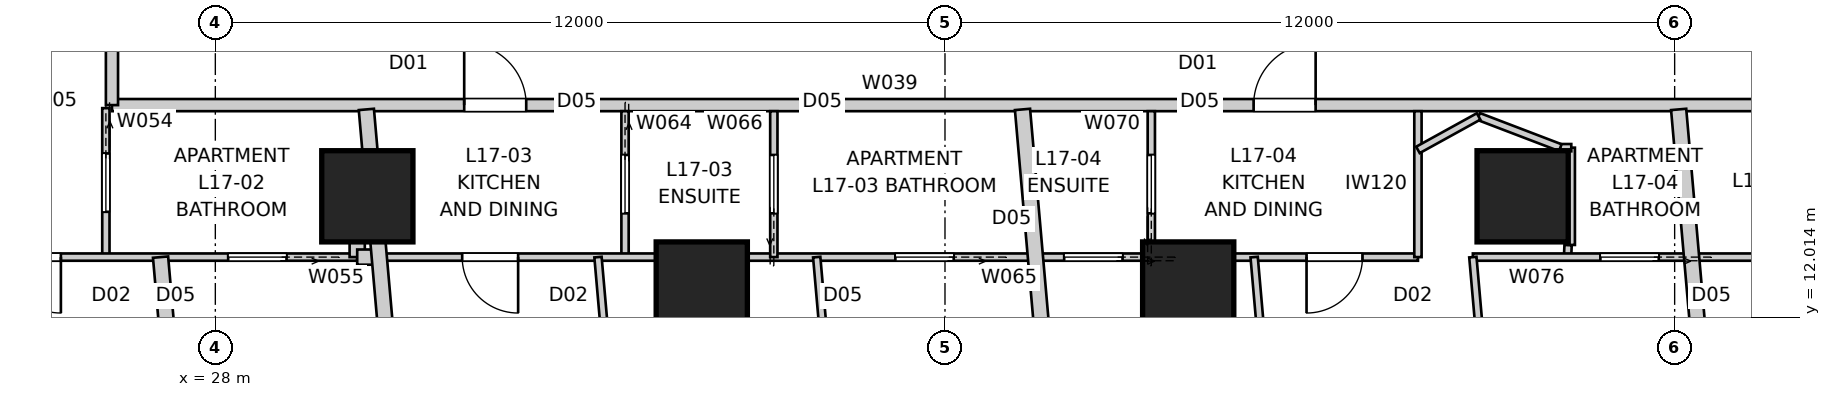
"""IFC4 building model, lengths in metres.
Left out: names, types, materials, properties, quantities, classifications, styles, units other than length and angle.
Written with IfcOpenShell. Run it as: python <this file> out.ifc"""

import sys

from ifc_helpers import new_model, si_unit, direction, frame, frame_2d, origin, origin_2d, place, context, subcontext, project, spatial, rectangle, extrude, element, fill, save


model = new_model("IFC4")
c1 = context("Model", 3, precision=1e-05, world=origin(), true_north=direction((0.0, 1.0)))
c2 = subcontext(c1, "Body", "Model", "MODEL_VIEW")
j1 = project(units=[si_unit("LENGTHUNIT", "METRE"), si_unit("PLANEANGLEUNIT", "RADIAN")], contexts=[c1])
p1 = place(None, origin())
s1 = spatial("IfcSite", under=j1, at=p1, CompositionType="ELEMENT")
p2 = place(p1, origin())
s2 = spatial("IfcBuilding", under=s1, at=p2, CompositionType="ELEMENT")
p3 = place(p2, frame((0.0, 0.0, 64.2)))
s3 = spatial("IfcBuildingStorey", under=s2, at=p3, CompositionType="ELEMENT", Elevation=64.2)
for number, where, z_axis, x_axis in (
    (1, (30.5, 14.0, 0.0), (0.0, 0.0, 1.0), (1.0, 0.0, 0.0)),
    (2, (36.0, 12.5, 0.0), (0.0, 0.0, 1.0), (1.0, 0.0, 0.0)),
    (3, (44.0, 12.5, 0.0), (0.0, 0.0, 1.0), (1.0, 0.0, 0.0)),
    (4, (49.5, 14.0, 0.0), (0.0, 0.0, 1.0), (1.0, 0.0, 0.0)),
):
    element("IfcColumn", number, at=place(p3, frame(where, z_axis=z_axis, x_axis=x_axis)), inside=s3, PredefinedType="COLUMN", context=c2, shape_type="SweptSolid", body=[
        extrude(rectangle(XDim=1.5, YDim=1.5, at=origin_2d()), origin(), (0.0, 0.0, 1.0), 3.4),
    ])
p4 = place(p3, frame((26.3, 15.5, 0.0), z_axis=(0.0, 0.0, 1.0), x_axis=(1.0, 0.0, 0.0)))
e5 = element("IfcWall", 5, at=p4, inside=s3, PredefinedType="PARTITIONING", context=c2, shape_type="SweptSolid", body=[
    extrude(rectangle(XDim=27.4, YDim=0.2, at=frame_2d((13.7, 0.0))), origin(), (0.0, 0.0, 1.0), 3.25),
])
p5 = place(p4, frame((18.776, 0.0, 0.0)))
e6 = element("IfcOpeningElement", 6, at=p5, cuts=e5, PredefinedType="OPENING", context=c2, shape_type="SweptSolid", body=[
    extrude(rectangle(XDim=1.02, YDim=2.34, at=frame_2d((0.51, 1.17))), frame((0.0, 0.11, 0.0), z_axis=(0.0, -1.0, 0.0), x_axis=(1.0, 0.0, 0.0)), (0.0, 0.0, 1.0), 0.22),
])
p6 = place(p4, frame((5.793, 0.0, 0.0)))
e7 = element("IfcOpeningElement", 7, at=p6, cuts=e5, PredefinedType="OPENING", context=c2, shape_type="SweptSolid", body=[
    extrude(rectangle(XDim=1.02, YDim=2.34, at=frame_2d((0.51, 1.17))), frame((0.0, 0.11, 0.0), z_axis=(0.0, -1.0, 0.0), x_axis=(1.0, 0.0, 0.0)), (0.0, 0.0, 1.0), 0.22),
])
p7 = place(p3, frame((26.3, 44.5, 0.0), z_axis=(0.0, 0.0, 1.0), x_axis=(0.0, -1.0, 0.0)))
e8 = element("IfcWall", 8, at=p7, inside=s3, PredefinedType="PARTITIONING", context=c2, shape_type="SweptSolid", body=[
    extrude(rectangle(XDim=29.0, YDim=0.2, at=frame_2d((14.5, 0.0))), origin(), (0.0, 0.0, 1.0), 3.25),
])
p8 = place(p7, frame((6.85, 0.0, 0.0)))
e9 = element("IfcOpeningElement", 9, at=p8, cuts=e8, PredefinedType="OPENING", context=c2, shape_type="SweptSolid", body=[
    extrude(rectangle(XDim=1.02, YDim=2.34, at=frame_2d((0.51, 1.17))), frame((0.0, 0.11, 0.0), z_axis=(0.0, -1.0, 0.0), x_axis=(1.0, 0.0, 0.0)), (0.0, 0.0, 1.0), 0.22),
])
p9 = place(p7, frame((2.345, 0.0, 0.0)))
e10 = element("IfcOpeningElement", 10, at=p9, cuts=e8, PredefinedType="OPENING", context=c2, shape_type="SweptSolid", body=[
    extrude(rectangle(XDim=1.02, YDim=2.1, at=frame_2d((0.51, 1.05))), frame((0.0, 0.11, 0.0), z_axis=(0.0, -1.0, 0.0), x_axis=(1.0, 0.0, 0.0)), (0.0, 0.0, 1.0), 0.22),
])
p10 = place(p7, frame((17.166, 0.0, 0.0)))
e11 = element("IfcOpeningElement", 11, at=p10, cuts=e8, PredefinedType="OPENING", context=c2, shape_type="SweptSolid", body=[
    extrude(rectangle(XDim=1.02, YDim=2.34, at=frame_2d((0.51, 1.17))), frame((0.0, 0.11, 0.0), z_axis=(0.0, -1.0, 0.0), x_axis=(1.0, 0.0, 0.0)), (0.0, 0.0, 1.0), 0.22),
])
p11 = place(p7, frame((27.055, 0.0, 0.0)))
e12 = element("IfcOpeningElement", 12, at=p11, cuts=e8, PredefinedType="OPENING", context=c2, shape_type="SweptSolid", body=[
    extrude(rectangle(XDim=1.02, YDim=2.34, at=frame_2d((0.51, 1.17))), frame((0.0, 0.11, 0.0), z_axis=(0.0, -1.0, 0.0), x_axis=(1.0, 0.0, 0.0)), (0.0, 0.0, 1.0), 0.22),
])
p12 = place(p3, frame((42.222, 4.597, 0.0), z_axis=(0.0, 0.0, 1.0), x_axis=(-0.087140211333, 0.996196056792, 0.0)))
e13 = element("IfcWall", 13, at=p12, inside=s3, PredefinedType="PARTITIONING", context=c2, shape_type="SweptSolid", body=[
    extrude(rectangle(XDim=10.873, YDim=0.25, at=frame_2d((5.437, 0.0))), origin(), (0.0, 0.0, 1.0), 3.25),
])
p13 = place(p3, frame((31.513, 3.66, 0.0), z_axis=(0.0, 0.0, 1.0), x_axis=(-0.087168232078, 0.996193605338, 0.0)))
e14 = element("IfcWall", 14, at=p13, inside=s3, PredefinedType="PARTITIONING", context=c2, shape_type="SweptSolid", body=[
    extrude(rectangle(XDim=11.814, YDim=0.25, at=frame_2d((5.907, 0.0))), origin(), (0.0, 0.0, 1.0), 3.25),
])
p14 = place(p3, frame((52.932, 5.534, 0.0), z_axis=(0.0, 0.0, 1.0), x_axis=(-0.087157803114, 0.996194517831, 0.0)))
e15 = element("IfcWall", 15, at=p14, inside=s3, PredefinedType="PARTITIONING", context=c2, shape_type="SweptSolid", body=[
    extrude(rectangle(XDim=9.933, YDim=0.25, at=frame_2d((4.966, 0.0))), origin(), (0.0, 0.0, 1.0), 3.25),
])
p15 = place(p3, frame((26.2, 15.45, 0.0), z_axis=(0.0, 0.0, 1.0), x_axis=(0.0, -1.0, 0.0)))
e16 = element("IfcWall", 16, at=p15, inside=s3, PredefinedType="PARTITIONING", context=c2, shape_type="SweptSolid", body=[
    extrude(rectangle(XDim=2.45, YDim=0.12, at=frame_2d((1.225, 0.0))), origin(), (0.0, 0.0, 1.0), 3.25),
])
p16 = place(p15, frame((0.745, 0.0, 0.0)))
e17 = element("IfcOpeningElement", 17, at=p16, cuts=e16, PredefinedType="OPENING", context=c2, shape_type="SweptSolid", body=[
    extrude(rectangle(XDim=0.96, YDim=2.1, at=frame_2d((0.48, 1.05))), frame((0.0, 0.07, 0.0), z_axis=(0.0, -1.0, 0.0), x_axis=(1.0, 0.0, 0.0)), (0.0, 0.0, 1.0), 0.14),
])
p17 = place(p3, frame((30.333, 13.0, 0.0), z_axis=(0.0, 0.0, 1.0), x_axis=(-1.0, 0.0, 0.0)))
e18 = element("IfcWall", 18, at=p17, inside=s3, PredefinedType="PARTITIONING", context=c2, shape_type="SweptSolid", body=[
    extrude(rectangle(XDim=6.533, YDim=0.12, at=frame_2d((3.267, 0.0))), origin(), (0.0, 0.0, 1.0), 3.25),
])
p18 = place(p17, frame((4.873, 0.0, 0.0)))
e19 = element("IfcOpeningElement", 19, at=p18, cuts=e18, PredefinedType="OPENING", context=c2, shape_type="SweptSolid", body=[
    extrude(rectangle(XDim=0.92, YDim=2.34, at=frame_2d((0.46, 1.17))), frame((0.0, 0.07, 0.0), z_axis=(0.0, -1.0, 0.0), x_axis=(1.0, 0.0, 0.0)), (0.0, 0.0, 1.0), 0.14),
])
p19 = place(p17, frame((1.162, 0.0, 0.0)))
e20 = element("IfcOpeningElement", 20, at=p19, cuts=e18, PredefinedType="OPENING", context=c2, shape_type="SweptSolid", body=[
    extrude(rectangle(XDim=0.96, YDim=2.1, at=frame_2d((0.48, 1.05))), frame((0.0, 0.07, 0.0), z_axis=(0.0, -1.0, 0.0), x_axis=(1.0, 0.0, 0.0)), (0.0, 0.0, 1.0), 0.14),
])
p20 = place(p3, frame((30.333, 14.396, 0.0), z_axis=(0.0, 0.0, 1.0), x_axis=(0.0, -1.0, 0.0)))
e21 = element("IfcWall", 21, at=p20, inside=s3, PredefinedType="PARTITIONING", context=c2, shape_type="SweptSolid", body=[
    extrude(rectangle(XDim=1.396, YDim=0.25, at=frame_2d((0.698, 0.0))), origin(), (0.0, 0.0, 1.0), 3.25),
])
p21 = place(p3, frame((27.099, 13.0, 0.0), z_axis=(0.0, 0.0, 1.0), x_axis=(0.087158236544, -0.99619447991, 0.0)))
e22 = element("IfcWall", 22, at=p21, inside=s3, PredefinedType="PARTITIONING", context=c2, shape_type="SweptSolid", body=[
    extrude(rectangle(XDim=8.689, YDim=0.25, at=frame_2d((4.344, 0.0))), origin(), (0.0, 0.0, 1.0), 2.638),
])
p22 = place(p3, frame((30.333, 13.0, 0.0), z_axis=(0.0, 0.0, 1.0), x_axis=(1.0, 0.0, 0.0)))
e23 = element("IfcWall", 23, at=p22, inside=s3, PredefinedType="PARTITIONING", context=c2, shape_type="SweptSolid", body=[
    extrude(rectangle(XDim=0.363, YDim=0.25, at=frame_2d((0.182, 0.0))), origin(), (0.0, 0.0, 1.0), 3.25),
])
p23 = place(p3, frame((34.738, 15.4, 0.0), z_axis=(0.0, 0.0, 1.0), x_axis=(0.0, -1.0, 0.0)))
e24 = element("IfcWall", 24, at=p23, inside=s3, PredefinedType="PARTITIONING", context=c2, shape_type="SweptSolid", body=[
    extrude(rectangle(XDim=2.4, YDim=0.12, at=frame_2d((1.2, 0.0))), origin(), (0.0, 0.0, 1.0), 3.25),
])
p24 = place(p23, frame((0.72, 0.0, 0.0)))
e25 = element("IfcOpeningElement", 25, at=p24, cuts=e24, PredefinedType="OPENING", context=c2, shape_type="SweptSolid", body=[
    extrude(rectangle(XDim=0.96, YDim=2.1, at=frame_2d((0.48, 1.05))), frame((0.0, 0.07, 0.0), z_axis=(0.0, -1.0, 0.0), x_axis=(1.0, 0.0, 0.0)), (0.0, 0.0, 1.0), 0.14),
])
p25 = place(p3, frame((47.778, 13.0, 0.0), z_axis=(0.0, 0.0, 1.0), x_axis=(-1.0, 0.0, 0.0)))
e26 = element("IfcWall", 26, at=p25, inside=s3, PredefinedType="PARTITIONING", context=c2, shape_type="SweptSolid", body=[
    extrude(rectangle(XDim=17.082, YDim=0.12, at=frame_2d((8.541, 0.0))), origin(), (0.0, 0.0, 1.0), 2.55),
])
p26 = place(p25, frame((0.912, 0.0, 0.0)))
e27 = element("IfcOpeningElement", 27, at=p26, cuts=e26, PredefinedType="OPENING", context=c2, shape_type="SweptSolid", body=[
    extrude(rectangle(XDim=0.92, YDim=2.34, at=frame_2d((0.46, 1.17))), frame((0.0, 0.07, 0.0), z_axis=(0.0, -1.0, 0.0), x_axis=(1.0, 0.0, 0.0)), (0.0, 0.0, 1.0), 0.14),
])
p27 = place(p25, frame((14.798, 0.0, 0.0)))
e28 = element("IfcOpeningElement", 28, at=p27, cuts=e26, PredefinedType="OPENING", context=c2, shape_type="SweptSolid", body=[
    extrude(rectangle(XDim=0.92, YDim=2.34, at=frame_2d((0.46, 1.17))), frame((0.0, 0.07, 0.0), z_axis=(0.0, -1.0, 0.0), x_axis=(1.0, 0.0, 0.0)), (0.0, 0.0, 1.0), 0.14),
])
p28 = place(p25, frame((4.858, 0.0, 0.0)))
e29 = element("IfcOpeningElement", 29, at=p28, cuts=e26, PredefinedType="OPENING", context=c2, shape_type="SweptSolid", body=[
    extrude(rectangle(XDim=0.96, YDim=2.1, at=frame_2d((0.48, 1.05))), frame((0.0, 0.07, 0.0), z_axis=(0.0, -1.0, 0.0), x_axis=(1.0, 0.0, 0.0)), (0.0, 0.0, 1.0), 0.14),
])
p29 = place(p25, frame((7.635, 0.0, 0.0)))
e30 = element("IfcOpeningElement", 30, at=p29, cuts=e26, PredefinedType="OPENING", context=c2, shape_type="SweptSolid", body=[
    extrude(rectangle(XDim=0.96, YDim=2.1, at=frame_2d((0.48, 1.05))), frame((0.0, 0.07, 0.0), z_axis=(0.0, -1.0, 0.0), x_axis=(1.0, 0.0, 0.0)), (0.0, 0.0, 1.0), 0.14),
])
p30 = place(p3, frame((37.185, 13.0, 0.0), z_axis=(0.0, 0.0, 1.0), x_axis=(0.0, 1.0, 0.0)))
e31 = element("IfcWall", 31, at=p30, inside=s3, PredefinedType="PARTITIONING", context=c2, shape_type="SweptSolid", body=[
    extrude(rectangle(XDim=2.4, YDim=0.12, at=frame_2d((1.2, 0.0))), origin(), (0.0, 0.0, 1.0), 2.796),
])
p31 = place(p30, frame((0.72, 0.0, 0.0)))
e32 = element("IfcOpeningElement", 32, at=p31, cuts=e31, PredefinedType="OPENING", context=c2, shape_type="SweptSolid", body=[
    extrude(rectangle(XDim=0.96, YDim=2.1, at=frame_2d((0.48, 1.05))), frame((0.0, 0.07, 0.0), z_axis=(0.0, -1.0, 0.0), x_axis=(1.0, 0.0, 0.0)), (0.0, 0.0, 1.0), 0.14),
])
p32 = place(p3, frame((34.293, 13.0, 0.0), z_axis=(0.0, 0.0, 1.0), x_axis=(0.087160907995, -0.996194246178, 0.0)))
e33 = element("IfcWall", 33, at=p32, inside=s3, PredefinedType="PARTITIONING", context=c2, shape_type="SweptSolid", body=[
    extrude(rectangle(XDim=9.022, YDim=0.12, at=frame_2d((4.511, 0.0))), origin(), (0.0, 0.0, 1.0), 3.25),
])
p33 = place(p32, frame((4.071, 0.0, 0.0)))
e34 = element("IfcOpeningElement", 34, at=p33, cuts=e33, PredefinedType="OPENING", context=c2, shape_type="SweptSolid", body=[
    extrude(rectangle(XDim=0.92, YDim=2.34, at=frame_2d((0.46, 1.17))), frame((0.0, 0.07, 0.0), z_axis=(0.0, -1.0, 0.0), x_axis=(1.0, 0.0, 0.0)), (0.0, 0.0, 1.0), 0.14),
])
p34 = place(p3, frame((37.89, 13.0, 0.0), z_axis=(0.0, 0.0, 1.0), x_axis=(0.087158256162, -0.996194478193, 0.0)))
e35 = element("IfcWall", 35, at=p34, inside=s3, PredefinedType="PARTITIONING", context=c2, shape_type="SweptSolid", body=[
    extrude(rectangle(XDim=8.709, YDim=0.12, at=frame_2d((4.354, 0.0))), origin(), (0.0, 0.0, 1.0), 3.25),
])
p35 = place(p3, frame((47.778, 15.4, 0.0), z_axis=(0.0, 0.0, 1.0), x_axis=(0.0, -1.0, 0.0)))
e36 = element("IfcWall", 36, at=p35, inside=s3, PredefinedType="PARTITIONING", context=c2, shape_type="SweptSolid", body=[
    extrude(rectangle(XDim=2.4, YDim=0.12, at=frame_2d((1.2, 0.0))), origin(), (0.0, 0.0, 1.0), 3.25),
])
p36 = place(p3, frame((43.393, 13.0, 0.0), z_axis=(0.0, 0.0, 1.0), x_axis=(0.0, 1.0, 0.0)))
e37 = element("IfcWall", 37, at=p36, inside=s3, PredefinedType="PARTITIONING", context=c2, shape_type="SweptSolid", body=[
    extrude(rectangle(XDim=2.4, YDim=0.12, at=frame_2d((1.2, 0.0))), origin(), (0.0, 0.0, 1.0), 3.25),
])
p37 = place(p36, frame((0.72, 0.0, 0.0)))
e38 = element("IfcOpeningElement", 38, at=p37, cuts=e37, PredefinedType="OPENING", context=c2, shape_type="SweptSolid", body=[
    extrude(rectangle(XDim=0.96, YDim=2.1, at=frame_2d((0.48, 1.05))), frame((0.0, 0.07, 0.0), z_axis=(0.0, -1.0, 0.0), x_axis=(1.0, 0.0, 0.0)), (0.0, 0.0, 1.0), 0.14),
])
p38 = place(p3, frame((50.239, 13.0, 0.0), z_axis=(0.0, 0.0, 1.0), x_axis=(0.045131013234, 0.99898107672, 0.0)))
e39 = element("IfcWall", 39, at=p38, inside=s3, PredefinedType="PARTITIONING", context=c2, shape_type="SweptSolid", body=[
    extrude(rectangle(XDim=0.2, YDim=0.12, at=frame_2d((0.1, 0.0))), origin(), (0.0, 0.0, 1.0), 3.25),
])
p39 = place(p3, frame((50.3, 13.2, 0.0), z_axis=(0.0, 0.0, 1.0), x_axis=(0.0, 1.0, 0.0)))
e40 = element("IfcWall", 40, at=p39, inside=s3, PredefinedType="PARTITIONING", context=c2, shape_type="SweptSolid", body=[
    extrude(rectangle(XDim=1.6, YDim=0.12, at=frame_2d((0.8, 0.0))), origin(), (0.0, 0.0, 1.0), 3.25),
])
p40 = place(p3, frame((50.119, 14.8, 0.0), z_axis=(0.0, 0.0, 1.0), x_axis=(-0.934135067997, 0.356919703488, 0.0)))
e41 = element("IfcWall", 41, at=p40, inside=s3, PredefinedType="PARTITIONING", context=c2, shape_type="SweptSolid", body=[
    extrude(rectangle(XDim=1.438, YDim=0.12, at=frame_2d((0.719, 0.0))), origin(), (0.0, 0.0, 1.0), 3.25),
])
p41 = place(p3, frame((48.775, 15.313, 0.0), z_axis=(0.0, 0.0, 1.0), x_axis=(-0.875508887439, -0.483202015741, 0.0)))
e42 = element("IfcWall", 42, at=p41, inside=s3, PredefinedType="PARTITIONING", context=c2, shape_type="SweptSolid", body=[
    extrude(rectangle(XDim=1.139, YDim=0.12, at=frame_2d((0.569, 0.0))), origin(), (0.0, 0.0, 1.0), 3.25),
])
p42 = place(p3, frame((56.2, 13.0, 0.0), z_axis=(0.0, 0.0, 1.0), x_axis=(-1.0, 0.0, 0.0)))
e43 = element("IfcWall", 43, at=p42, inside=s3, PredefinedType="PARTITIONING", context=c2, shape_type="SweptSolid", body=[
    extrude(rectangle(XDim=7.519, YDim=0.12, at=frame_2d((3.759, 0.0))), origin(), (0.0, 0.0, 1.0), 3.25),
])
p43 = place(p42, frame((1.618, 0.0, 0.0)))
e44 = element("IfcOpeningElement", 44, at=p43, cuts=e43, PredefinedType="OPENING", context=c2, shape_type="SweptSolid", body=[
    extrude(rectangle(XDim=0.96, YDim=2.1, at=frame_2d((0.48, 1.05))), frame((0.0, 0.07, 0.0), z_axis=(0.0, -1.0, 0.0), x_axis=(1.0, 0.0, 0.0)), (0.0, 0.0, 1.0), 0.14),
])
p44 = place(p42, frame((4.461, 0.0, 0.0)))
e45 = element("IfcOpeningElement", 45, at=p44, cuts=e43, PredefinedType="OPENING", context=c2, shape_type="SweptSolid", body=[
    extrude(rectangle(XDim=0.96, YDim=2.1, at=frame_2d((0.48, 1.05))), frame((0.0, 0.07, 0.0), z_axis=(0.0, -1.0, 0.0), x_axis=(1.0, 0.0, 0.0)), (0.0, 0.0, 1.0), 0.14),
])
p45 = place(p3, frame((45.084, 13.0, 0.0), z_axis=(0.0, 0.0, 1.0), x_axis=(0.087184938313, -0.99619214338, 0.0)))
e46 = element("IfcWall", 46, at=p45, inside=s3, PredefinedType="PARTITIONING", context=c2, shape_type="SweptSolid", body=[
    extrude(rectangle(XDim=8.082, YDim=0.12, at=frame_2d((4.041, 0.0))), origin(), (0.0, 0.0, 1.0), 3.25),
])
p46 = place(p3, frame((48.681, 13.0, 0.0), z_axis=(0.0, 0.0, 1.0), x_axis=(0.0871517452, -0.996195047824, 0.0)))
e47 = element("IfcWall", 47, at=p46, inside=s3, PredefinedType="PARTITIONING", context=c2, shape_type="SweptSolid", body=[
    extrude(rectangle(XDim=7.768, YDim=0.12, at=frame_2d((3.884, 0.0))), origin(), (0.0, 0.0, 1.0), 3.25),
])
p47 = place(p46, frame((3.444, 0.0, 0.0)))
e48 = element("IfcOpeningElement", 48, at=p47, cuts=e47, PredefinedType="OPENING", context=c2, shape_type="SweptSolid", body=[
    extrude(rectangle(XDim=0.92, YDim=2.34, at=frame_2d((0.46, 1.17))), frame((0.0, 0.07, 0.0), z_axis=(0.0, -1.0, 0.0), x_axis=(1.0, 0.0, 0.0)), (0.0, 0.0, 1.0), 0.14),
])
p48 = place(p3, frame((50.3, 14.8, 0.0), z_axis=(0.0, 0.0, 1.0), x_axis=(-1.0, 0.0, 0.0)))
e49 = element("IfcWall", 49, at=p48, inside=s3, PredefinedType="PARTITIONING", context=c2, shape_type="SweptSolid", body=[
    extrude(rectangle(XDim=0.181, YDim=0.12, at=frame_2d((0.09, 0.0))), origin(), (0.0, 0.0, 1.0), 3.25),
])
p49 = place(p5, origin())
e50 = element("IfcDoor", 50, at=p49, inside=s3, OperationType="SINGLE_SWING_RIGHT", PredefinedType="DOOR", context=c2, shape_type="SweptSolid", body=[
    extrude(rectangle(XDim=1.02, YDim=2.34, at=frame_2d((0.51, 1.17))), frame((0.0, 0.025, 0.0), z_axis=(0.0, -1.0, 0.0), x_axis=(1.0, 0.0, 0.0)), (0.0, 0.0, 1.0), 0.05),
])
fill(e6, e50)
p50 = place(p6, origin())
e51 = element("IfcDoor", 51, at=p50, inside=s3, OperationType="SINGLE_SWING_LEFT", PredefinedType="DOOR", context=c2, shape_type="SweptSolid", body=[
    extrude(rectangle(XDim=1.02, YDim=2.34, at=frame_2d((0.51, 1.17))), frame((0.0, 0.025, 0.0), z_axis=(0.0, -1.0, 0.0), x_axis=(1.0, 0.0, 0.0)), (0.0, 0.0, 1.0), 0.05),
])
fill(e7, e51)
p51 = place(p26, origin())
e52 = element("IfcDoor", 52, at=p51, inside=s3, OperationType="SINGLE_SWING_RIGHT", PredefinedType="DOOR", context=c2, shape_type="SweptSolid", body=[
    extrude(rectangle(XDim=0.92, YDim=2.34, at=frame_2d((0.46, 1.17))), frame((0.0, 0.025, 0.0), z_axis=(0.0, -1.0, 0.0), x_axis=(1.0, 0.0, 0.0)), (0.0, 0.0, 1.0), 0.05),
])
fill(e27, e52)
p52 = place(p37, origin())
e53 = element("IfcDoor", 53, at=p52, inside=s3, OperationType="SLIDING_TO_LEFT", PredefinedType="DOOR", context=c2, shape_type="SweptSolid", body=[
    extrude(rectangle(XDim=0.96, YDim=2.1, at=frame_2d((0.48, 1.05))), frame((0.0, 0.025, 0.0), z_axis=(0.0, -1.0, 0.0), x_axis=(1.0, 0.0, 0.0)), (0.0, 0.0, 1.0), 0.05),
])
fill(e38, e53)
p53 = place(p27, origin())
e54 = element("IfcDoor", 54, at=p53, inside=s3, OperationType="SINGLE_SWING_LEFT", PredefinedType="DOOR", context=c2, shape_type="SweptSolid", body=[
    extrude(rectangle(XDim=0.92, YDim=2.34, at=frame_2d((0.46, 1.17))), frame((0.0, 0.025, 0.0), z_axis=(0.0, -1.0, 0.0), x_axis=(1.0, 0.0, 0.0)), (0.0, 0.0, 1.0), 0.05),
])
fill(e28, e54)
p54 = place(p24, origin())
e55 = element("IfcDoor", 55, at=p54, inside=s3, OperationType="SLIDING_TO_LEFT", PredefinedType="DOOR", context=c2, shape_type="SweptSolid", body=[
    extrude(rectangle(XDim=0.96, YDim=2.1, at=frame_2d((0.48, 1.05))), frame((0.0, 0.025, 0.0), z_axis=(0.0, -1.0, 0.0), x_axis=(1.0, 0.0, 0.0)), (0.0, 0.0, 1.0), 0.05),
])
fill(e25, e55)
p55 = place(p16, origin())
e56 = element("IfcDoor", 56, at=p55, inside=s3, OperationType="SLIDING_TO_LEFT", PredefinedType="DOOR", context=c2, shape_type="SweptSolid", body=[
    extrude(rectangle(XDim=0.96, YDim=2.1, at=frame_2d((0.48, 1.05))), frame((0.0, 0.025, 0.0), z_axis=(0.0, -1.0, 0.0), x_axis=(1.0, 0.0, 0.0)), (0.0, 0.0, 1.0), 0.05),
])
fill(e17, e56)
p56 = place(p18, origin())
e57 = element("IfcDoor", 57, at=p56, inside=s3, OperationType="SINGLE_SWING_LEFT", PredefinedType="DOOR", context=c2, shape_type="SweptSolid", body=[
    extrude(rectangle(XDim=0.92, YDim=2.34, at=frame_2d((0.46, 1.17))), frame((0.0, 0.025, 0.0), z_axis=(0.0, -1.0, 0.0), x_axis=(1.0, 0.0, 0.0)), (0.0, 0.0, 1.0), 0.05),
])
fill(e19, e57)
p57 = place(p28, origin())
e58 = element("IfcDoor", 58, at=p57, inside=s3, OperationType="SLIDING_TO_LEFT", PredefinedType="DOOR", context=c2, shape_type="SweptSolid", body=[
    extrude(rectangle(XDim=0.96, YDim=2.1, at=frame_2d((0.48, 1.05))), frame((0.0, 0.025, 0.0), z_axis=(0.0, -1.0, 0.0), x_axis=(1.0, 0.0, 0.0)), (0.0, 0.0, 1.0), 0.05),
])
fill(e29, e58)
p58 = place(p31, origin())
e59 = element("IfcDoor", 59, at=p58, inside=s3, OperationType="SLIDING_TO_LEFT", PredefinedType="DOOR", context=c2, shape_type="SweptSolid", body=[
    extrude(rectangle(XDim=0.96, YDim=2.1, at=frame_2d((0.48, 1.05))), frame((0.0, 0.025, 0.0), z_axis=(0.0, -1.0, 0.0), x_axis=(1.0, 0.0, 0.0)), (0.0, 0.0, 1.0), 0.05),
])
fill(e32, e59)
p59 = place(p19, origin())
e60 = element("IfcDoor", 60, at=p59, inside=s3, OperationType="SLIDING_TO_LEFT", PredefinedType="DOOR", context=c2, shape_type="SweptSolid", body=[
    extrude(rectangle(XDim=0.96, YDim=2.1, at=frame_2d((0.48, 1.05))), frame((0.0, 0.025, 0.0), z_axis=(0.0, -1.0, 0.0), x_axis=(1.0, 0.0, 0.0)), (0.0, 0.0, 1.0), 0.05),
])
fill(e20, e60)
p60 = place(p29, origin())
e61 = element("IfcDoor", 61, at=p60, inside=s3, OperationType="SLIDING_TO_LEFT", PredefinedType="DOOR", context=c2, shape_type="SweptSolid", body=[
    extrude(rectangle(XDim=0.96, YDim=2.1, at=frame_2d((0.48, 1.05))), frame((0.0, 0.025, 0.0), z_axis=(0.0, -1.0, 0.0), x_axis=(1.0, 0.0, 0.0)), (0.0, 0.0, 1.0), 0.05),
])
fill(e30, e61)
p61 = place(p44, origin())
e62 = element("IfcDoor", 62, at=p61, inside=s3, OperationType="SLIDING_TO_LEFT", PredefinedType="DOOR", context=c2, shape_type="SweptSolid", body=[
    extrude(rectangle(XDim=0.96, YDim=2.1, at=frame_2d((0.48, 1.05))), frame((0.0, 0.025, 0.0), z_axis=(0.0, -1.0, 0.0), x_axis=(1.0, 0.0, 0.0)), (0.0, 0.0, 1.0), 0.05),
])
fill(e45, e62)
save(model, sys.argv[1])
